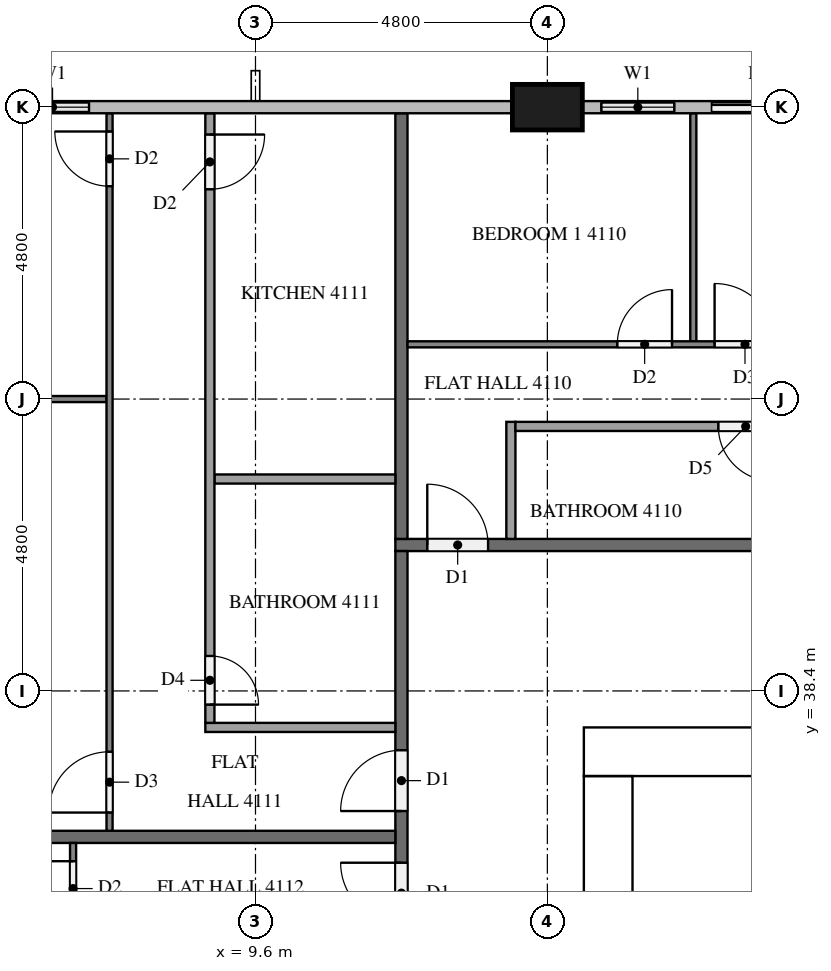
"""IFC4 building model, lengths in metres.
Left out: names, types, materials, properties, quantities, classifications, styles, units other than length and angle.
Written with IfcOpenShell. Run it as: python <this file> out.ifc"""

import sys

from ifc_helpers import new_model, si_unit, direction, frame, frame_2d, origin, origin_2d, place, context, subcontext, project, spatial, rectangle, extrude, element, fill, save


model = new_model("IFC4")
c1 = context("Model", 3, precision=1e-05, world=origin(), true_north=direction((0.0, 1.0)))
c2 = subcontext(c1, "Body", "Model", "MODEL_VIEW")
j1 = project(units=[si_unit("LENGTHUNIT", "METRE"), si_unit("PLANEANGLEUNIT", "RADIAN")], contexts=[c1])
p1 = place(None, origin())
s1 = spatial("IfcSite", under=j1, at=p1, CompositionType="ELEMENT")
p2 = place(p1, origin())
s2 = spatial("IfcBuilding", under=s1, at=p2, CompositionType="ELEMENT")
p3 = place(p2, frame((0.0, 0.0, 159.5)))
s3 = spatial("IfcBuildingStorey", under=s2, at=p3, CompositionType="ELEMENT", Elevation=159.5)
p4 = place(p3, frame((15.0, 37.4, 0.0), z_axis=(0.0, 0.0, 1.0), x_axis=(1.0, 0.0, 0.0)))
e1 = element("IfcWall", 1, at=p4, inside=s3, PredefinedType="SHEAR", context=c2, shape_type="SweptSolid", body=[
    extrude(rectangle(XDim=32.4, YDim=0.8, at=frame_2d((16.2, 0.0))), origin(), (0.0, 0.0, 1.0), 3.2),
])
p5 = place(p4, frame((15.3, 0.0, 0.0)))
e2 = element("IfcOpeningElement", 2, at=p5, cuts=e1, PredefinedType="OPENING", context=c2, shape_type="SweptSolid", body=[
    extrude(rectangle(XDim=1.8, YDim=2.1, at=frame_2d((0.9, 1.05))), frame((0.0, 0.41, 0.0), z_axis=(0.0, -1.0, 0.0), x_axis=(1.0, 0.0, 0.0)), (0.0, 0.0, 1.0), 0.82),
])
p6 = place(p4, frame((1.51, 0.0, 0.0)))
e3 = element("IfcOpeningElement", 3, at=p6, cuts=e1, PredefinedType="OPENING", context=c2, shape_type="SweptSolid", body=[
    extrude(rectangle(XDim=1.0, YDim=2.1, at=frame_2d((0.5, 1.05))), frame((0.0, 0.41, 0.0), z_axis=(0.0, -1.0, 0.0), x_axis=(1.0, 0.0, 0.0)), (0.0, 0.0, 1.0), 0.82),
])
p7 = place(p4, frame((5.11, 0.0, 0.0)))
e4 = element("IfcOpeningElement", 4, at=p7, cuts=e1, PredefinedType="OPENING", context=c2, shape_type="SweptSolid", body=[
    extrude(rectangle(XDim=1.0, YDim=2.1, at=frame_2d((0.5, 1.05))), frame((0.0, 0.41, 0.0), z_axis=(0.0, -1.0, 0.0), x_axis=(1.0, 0.0, 0.0)), (0.0, 0.0, 1.0), 0.82),
])
p8 = place(p3, frame((15.4, 15.8, 0.0), z_axis=(0.0, 0.0, 1.0), x_axis=(0.0, 1.0, 0.0)))
e5 = element("IfcWall", 5, at=p8, inside=s3, PredefinedType="SHEAR", context=c2, shape_type="SweptSolid", body=[
    extrude(rectangle(XDim=21.2, YDim=0.8, at=frame_2d((10.6, 0.0))), origin(), (0.0, 0.0, 1.0), 3.2),
])
p9 = place(p8, frame((4.96, 0.0, 0.0)))
e6 = element("IfcOpeningElement", 6, at=p9, cuts=e5, PredefinedType="OPENING", context=c2, shape_type="SweptSolid", body=[
    extrude(rectangle(XDim=1.2, YDim=2.1, at=frame_2d((0.6, 1.05))), frame((0.0, 0.41, 0.0), z_axis=(0.0, -1.0, 0.0), x_axis=(1.0, 0.0, 0.0)), (0.0, 0.0, 1.0), 0.82),
])
p10 = place(p3, frame((14.4, 48.0, 0.0), z_axis=(0.0, 0.0, 1.0), x_axis=(1.0, 0.0, 0.0)))
e7 = element("IfcColumn", 7, at=p10, inside=s3, PredefinedType="COLUMN", context=c2, shape_type="SweptSolid", body=[
    extrude(rectangle(XDim=1.15, YDim=0.75, at=origin_2d()), origin(), (0.0, 0.0, 1.0), 3.2),
])
p11 = place(p3, frame((19.2, 48.0, 0.0), z_axis=(0.0, 0.0, 1.0), x_axis=(-1.0, 0.0, 0.0)))
e8 = element("IfcWall", 8, at=p11, inside=s3, PredefinedType="SOLIDWALL", context=c2, shape_type="SweptSolid", body=[
    extrude(rectangle(XDim=4.225, YDim=0.15, at=frame_2d((2.112, 0.0))), origin(), (0.0, 0.0, 1.0), 3.2),
])
p12 = place(p11, frame((0.3, 0.0, 0.0)))
e9 = element("IfcOpeningElement", 9, at=p12, cuts=e8, PredefinedType="OPENING", context=c2, shape_type="SweptSolid", body=[
    extrude(rectangle(XDim=1.8, YDim=2.4, at=frame_2d((0.9, 1.2))), frame((0.0, 0.085, 0.0), z_axis=(0.0, -1.0, 0.0), x_axis=(1.0, 0.0, 0.0)), (0.0, 0.0, 1.0), 0.17),
])
p13 = place(p11, frame((2.712, 0.0, 0.9)))
e10 = element("IfcOpeningElement", 10, at=p13, cuts=e8, PredefinedType="OPENING", context=c2, shape_type="SweptSolid", body=[
    extrude(rectangle(XDim=1.2, YDim=1.4, at=frame_2d((0.6, 0.7))), frame((0.0, 0.085, 0.0), z_axis=(0.0, -1.0, 0.0), x_axis=(1.0, 0.0, 0.0)), (0.0, 0.0, 1.0), 0.17),
])
p14 = place(p3, frame((7.2, 48.0, 0.0), z_axis=(0.0, 0.0, 1.0), x_axis=(-1.0, 0.0, 0.0)))
e11 = element("IfcWall", 11, at=p14, inside=s3, PredefinedType="SOLIDWALL", context=c2, shape_type="SweptSolid", body=[
    extrude(rectangle(XDim=1.875, YDim=0.15, at=frame_2d((0.938, 0.0))), origin(), (0.0, 0.0, 1.0), 3.2),
])
p15 = place(p14, frame((0.337, 0.0, 0.9)))
e12 = element("IfcOpeningElement", 12, at=p15, cuts=e11, PredefinedType="OPENING", context=c2, shape_type="SweptSolid", body=[
    extrude(rectangle(XDim=1.2, YDim=1.4, at=frame_2d((0.6, 0.7))), frame((0.0, 0.085, 0.0), z_axis=(0.0, -1.0, 0.0), x_axis=(1.0, 0.0, 0.0)), (0.0, 0.0, 1.0), 0.17),
])
p16 = place(p3, frame((11.9, 40.8, 0.0), z_axis=(0.0, 0.0, 1.0), x_axis=(1.0, 0.0, 0.0)))
e13 = element("IfcWall", 13, at=p16, inside=s3, PredefinedType="PARTITIONING", context=c2, shape_type="SweptSolid", body=[
    extrude(rectangle(XDim=38.6, YDim=0.2, at=frame_2d((19.3, 0.0))), origin(), (0.0, 0.0, 1.0), 3.2),
])
p17 = place(p16, frame((31.725, 0.0, 0.0)))
e14 = element("IfcOpeningElement", 14, at=p17, cuts=e13, PredefinedType="OPENING", context=c2, shape_type="SweptSolid", body=[
    extrude(rectangle(XDim=1.0, YDim=2.1, at=frame_2d((0.5, 1.05))), frame((0.0, 0.11, 0.0), z_axis=(0.0, -1.0, 0.0), x_axis=(1.0, 0.0, 0.0)), (0.0, 0.0, 1.0), 0.22),
])
p18 = place(p16, frame((17.325, 0.0, 0.0)))
e15 = element("IfcOpeningElement", 15, at=p18, cuts=e13, PredefinedType="OPENING", context=c2, shape_type="SweptSolid", body=[
    extrude(rectangle(XDim=1.0, YDim=2.1, at=frame_2d((0.5, 1.05))), frame((0.0, 0.11, 0.0), z_axis=(0.0, -1.0, 0.0), x_axis=(1.0, 0.0, 0.0)), (0.0, 0.0, 1.0), 0.22),
])
p19 = place(p16, frame((0.525, 0.0, 0.0)))
e16 = element("IfcOpeningElement", 16, at=p19, cuts=e13, PredefinedType="OPENING", context=c2, shape_type="SweptSolid", body=[
    extrude(rectangle(XDim=1.0, YDim=2.1, at=frame_2d((0.5, 1.05))), frame((0.0, 0.11, 0.0), z_axis=(0.0, -1.0, 0.0), x_axis=(1.0, 0.0, 0.0)), (0.0, 0.0, 1.0), 0.22),
])
p20 = place(p3, frame((12.0, 12.1, 0.0), z_axis=(0.0, 0.0, 1.0), x_axis=(0.0, 1.0, 0.0)))
e17 = element("IfcWall", 17, at=p20, inside=s3, PredefinedType="PARTITIONING", context=c2, shape_type="SweptSolid", body=[
    extrude(rectangle(XDim=28.6, YDim=0.2, at=frame_2d((14.3, 0.0))), origin(), (0.0, 0.0, 1.0), 3.2),
])
p21 = place(p20, frame((24.325, 0.0, 0.0)))
e18 = element("IfcOpeningElement", 18, at=p21, cuts=e17, PredefinedType="OPENING", context=c2, shape_type="SweptSolid", body=[
    extrude(rectangle(XDim=1.0, YDim=2.1, at=frame_2d((0.5, 1.05))), frame((0.0, 0.11, 0.0), z_axis=(0.0, -1.0, 0.0), x_axis=(1.0, 0.0, 0.0)), (0.0, 0.0, 1.0), 0.22),
])
p22 = place(p20, frame((22.475, 0.0, 0.0)))
e19 = element("IfcOpeningElement", 19, at=p22, cuts=e17, PredefinedType="OPENING", context=c2, shape_type="SweptSolid", body=[
    extrude(rectangle(XDim=1.0, YDim=2.1, at=frame_2d((0.5, 1.05))), frame((0.0, 0.11, 0.0), z_axis=(0.0, -1.0, 0.0), x_axis=(1.0, 0.0, 0.0)), (0.0, 0.0, 1.0), 0.22),
])
p23 = place(p20, frame((0.325, 0.0, 0.0)))
e20 = element("IfcOpeningElement", 20, at=p23, cuts=e17, PredefinedType="OPENING", context=c2, shape_type="SweptSolid", body=[
    extrude(rectangle(XDim=1.0, YDim=2.1, at=frame_2d((0.5, 1.05))), frame((0.0, 0.11, 0.0), z_axis=(0.0, -1.0, 0.0), x_axis=(1.0, 0.0, 0.0)), (0.0, 0.0, 1.0), 0.22),
])
p24 = place(p3, frame((12.0, 47.9, 0.0), z_axis=(0.0, 0.0, 1.0), x_axis=(0.0, -1.0, 0.0)))
e21 = element("IfcWall", 21, at=p24, inside=s3, PredefinedType="PARTITIONING", context=c2, shape_type="SweptSolid", body=[
    extrude(rectangle(XDim=7.0, YDim=0.2, at=frame_2d((3.5, 0.0))), origin(), (0.0, 0.0, 1.0), 3.2),
])
p25 = place(p3, frame((0.1, 36.0, 0.0), z_axis=(0.0, 0.0, 1.0), x_axis=(1.0, 0.0, 0.0)))
e22 = element("IfcWall", 22, at=p25, inside=s3, PredefinedType="PARTITIONING", context=c2, shape_type="SweptSolid", body=[
    extrude(rectangle(XDim=11.8, YDim=0.2, at=frame_2d((5.9, 0.0))), origin(), (0.0, 0.0, 1.0), 3.2),
])
p26 = place(p3, frame((16.8, 44.15, 0.0), z_axis=(0.0, 0.0, 1.0), x_axis=(0.0, 1.0, 0.0)))
e23 = element("IfcWall", 23, at=p26, inside=s3, PredefinedType="PARTITIONING", context=c2, shape_type="SweptSolid", body=[
    extrude(rectangle(XDim=3.75, YDim=0.1, at=frame_2d((1.875, 0.0))), origin(), (0.0, 0.0, 1.0), 3.2),
])
p27 = place(p3, frame((12.1, 44.1, 0.0), z_axis=(0.0, 0.0, 1.0), x_axis=(1.0, 0.0, 0.0)))
e24 = element("IfcWall", 24, at=p27, inside=s3, PredefinedType="PARTITIONING", context=c2, shape_type="SweptSolid", body=[
    extrude(rectangle(XDim=16.6, YDim=0.1, at=frame_2d((8.3, 0.0))), origin(), (0.0, 0.0, 1.0), 3.2),
])
p28 = place(p27, frame((3.45, 0.0, 0.0)))
e25 = element("IfcOpeningElement", 25, at=p28, cuts=e24, PredefinedType="OPENING", context=c2, shape_type="SweptSolid", body=[
    extrude(rectangle(XDim=0.9, YDim=2.1, at=frame_2d((0.45, 1.05))), frame((0.0, 0.06, 0.0), z_axis=(0.0, -1.0, 0.0), x_axis=(1.0, 0.0, 0.0)), (0.0, 0.0, 1.0), 0.12),
])
p29 = place(p27, frame((5.05, 0.0, 0.0)))
e26 = element("IfcOpeningElement", 26, at=p29, cuts=e24, PredefinedType="OPENING", context=c2, shape_type="SweptSolid", body=[
    extrude(rectangle(XDim=1.0, YDim=2.1, at=frame_2d((0.5, 1.05))), frame((0.0, 0.06, 0.0), z_axis=(0.0, -1.0, 0.0), x_axis=(1.0, 0.0, 0.0)), (0.0, 0.0, 1.0), 0.12),
])
p30 = place(p27, frame((15.4, 0.0, 0.0)))
e27 = element("IfcOpeningElement", 27, at=p30, cuts=e24, PredefinedType="OPENING", context=c2, shape_type="SweptSolid", body=[
    extrude(rectangle(XDim=0.9, YDim=2.1, at=frame_2d((0.45, 1.05))), frame((0.0, 0.06, 0.0), z_axis=(0.0, -1.0, 0.0), x_axis=(1.0, 0.0, 0.0)), (0.0, 0.0, 1.0), 0.12),
])
p31 = place(p3, frame((13.8, 40.9, 0.0), z_axis=(0.0, 0.0, 1.0), x_axis=(0.0, 1.0, 0.0)))
e28 = element("IfcWall", 28, at=p31, inside=s3, PredefinedType="PARTITIONING", context=c2, shape_type="SweptSolid", body=[
    extrude(rectangle(XDim=1.925, YDim=0.15, at=frame_2d((0.962, 0.0))), origin(), (0.0, 0.0, 1.0), 3.2),
])
p32 = place(p3, frame((28.7, 42.75, 0.0), z_axis=(0.0, 0.0, 1.0), x_axis=(-1.0, 0.0, 0.0)))
e29 = element("IfcWall", 29, at=p32, inside=s3, PredefinedType="PARTITIONING", context=c2, shape_type="SweptSolid", body=[
    extrude(rectangle(XDim=14.825, YDim=0.15, at=frame_2d((7.413, 0.0))), origin(), (0.0, 0.0, 1.0), 3.2),
])
p33 = place(p32, frame((10.588, 0.0, 0.0)))
e30 = element("IfcOpeningElement", 30, at=p33, cuts=e29, PredefinedType="OPENING", context=c2, shape_type="SweptSolid", body=[
    extrude(rectangle(XDim=0.9, YDim=2.1, at=frame_2d((0.45, 1.05))), frame((0.0, 0.085, 0.0), z_axis=(0.0, -1.0, 0.0), x_axis=(1.0, 0.0, 0.0)), (0.0, 0.0, 1.0), 0.17),
])
p34 = place(p32, frame((9.138, 0.0, 0.0)))
e31 = element("IfcOpeningElement", 31, at=p34, cuts=e29, PredefinedType="OPENING", context=c2, shape_type="SweptSolid", body=[
    extrude(rectangle(XDim=0.8, YDim=2.1, at=frame_2d((0.4, 1.05))), frame((0.0, 0.085, 0.0), z_axis=(0.0, -1.0, 0.0), x_axis=(1.0, 0.0, 0.0)), (0.0, 0.0, 1.0), 0.17),
])
p35 = place(p32, frame((0.35, 0.0, 0.0)))
e32 = element("IfcOpeningElement", 32, at=p35, cuts=e29, PredefinedType="OPENING", context=c2, shape_type="SweptSolid", body=[
    extrude(rectangle(XDim=0.9, YDim=2.1, at=frame_2d((0.45, 1.05))), frame((0.0, 0.085, 0.0), z_axis=(0.0, -1.0, 0.0), x_axis=(1.0, 0.0, 0.0)), (0.0, 0.0, 1.0), 0.17),
])
p36 = place(p3, frame((7.15, 43.2, 0.0), z_axis=(0.0, 0.0, 1.0), x_axis=(-1.0, 0.0, 0.0)))
e33 = element("IfcWall", 33, at=p36, inside=s3, PredefinedType="PARTITIONING", context=c2, shape_type="SweptSolid", body=[
    extrude(rectangle(XDim=6.625, YDim=0.1, at=frame_2d((3.312, 0.0))), origin(), (0.0, 0.0, 1.0), 3.2),
])
p37 = place(p3, frame((7.2, 36.1, 0.0), z_axis=(0.0, 0.0, 1.0), x_axis=(0.0, 1.0, 0.0)))
e34 = element("IfcWall", 34, at=p37, inside=s3, PredefinedType="PARTITIONING", context=c2, shape_type="SweptSolid", body=[
    extrude(rectangle(XDim=11.8, YDim=0.1, at=frame_2d((5.9, 0.0))), origin(), (0.0, 0.0, 1.0), 3.2),
])
p38 = place(p37, frame((0.3, 0.0, 0.0)))
e35 = element("IfcOpeningElement", 35, at=p38, cuts=e34, PredefinedType="OPENING", context=c2, shape_type="SweptSolid", body=[
    extrude(rectangle(XDim=1.0, YDim=2.1, at=frame_2d((0.5, 1.05))), frame((0.0, 0.06, 0.0), z_axis=(0.0, -1.0, 0.0), x_axis=(1.0, 0.0, 0.0)), (0.0, 0.0, 1.0), 0.12),
])
p39 = place(p37, frame((10.6, 0.0, 0.0)))
e36 = element("IfcOpeningElement", 36, at=p39, cuts=e34, PredefinedType="OPENING", context=c2, shape_type="SweptSolid", body=[
    extrude(rectangle(XDim=0.9, YDim=2.1, at=frame_2d((0.45, 1.05))), frame((0.0, 0.06, 0.0), z_axis=(0.0, -1.0, 0.0), x_axis=(1.0, 0.0, 0.0)), (0.0, 0.0, 1.0), 0.12),
])
p40 = place(p3, frame((11.9, 41.885, 0.0), z_axis=(0.0, 0.0, 1.0), x_axis=(-1.0, 0.0, 0.0)))
e37 = element("IfcWall", 37, at=p40, inside=s3, PredefinedType="PARTITIONING", context=c2, shape_type="SweptSolid", body=[
    extrude(rectangle(XDim=2.975, YDim=0.15, at=frame_2d((1.487, 0.0))), origin(), (0.0, 0.0, 1.0), 3.2),
])
p41 = place(p3, frame((11.9, 37.8, 0.0), z_axis=(0.0, 0.0, 1.0), x_axis=(-1.0, 0.0, 0.0)))
e38 = element("IfcWall", 38, at=p41, inside=s3, PredefinedType="PARTITIONING", context=c2, shape_type="SweptSolid", body=[
    extrude(rectangle(XDim=3.125, YDim=0.15, at=frame_2d((1.562, 0.0))), origin(), (0.0, 0.0, 1.0), 3.2),
])
p42 = place(p3, frame((8.85, 47.9, 0.0), z_axis=(0.0, 0.0, 1.0), x_axis=(0.0, -1.0, 0.0)))
e39 = element("IfcWall", 39, at=p42, inside=s3, PredefinedType="PARTITIONING", context=c2, shape_type="SweptSolid", body=[
    extrude(rectangle(XDim=10.025, YDim=0.15, at=frame_2d((5.012, 0.0))), origin(), (0.0, 0.0, 1.0), 3.2),
])
p43 = place(p42, frame((8.925, 0.0, 0.0)))
e40 = element("IfcOpeningElement", 40, at=p43, cuts=e39, PredefinedType="OPENING", context=c2, shape_type="SweptSolid", body=[
    extrude(rectangle(XDim=0.8, YDim=2.1, at=frame_2d((0.4, 1.05))), frame((0.0, 0.085, 0.0), z_axis=(0.0, -1.0, 0.0), x_axis=(1.0, 0.0, 0.0)), (0.0, 0.0, 1.0), 0.17),
])
p44 = place(p42, frame((0.35, 0.0, 0.0)))
e41 = element("IfcOpeningElement", 41, at=p44, cuts=e39, PredefinedType="OPENING", context=c2, shape_type="SweptSolid", body=[
    extrude(rectangle(XDim=0.9, YDim=2.1, at=frame_2d((0.45, 1.05))), frame((0.0, 0.085, 0.0), z_axis=(0.0, -1.0, 0.0), x_axis=(1.0, 0.0, 0.0)), (0.0, 0.0, 1.0), 0.17),
])
p45 = place(p3, frame((6.6, 26.5, 0.0), z_axis=(0.0, 0.0, 1.0), x_axis=(0.0, 1.0, 0.0)))
e42 = element("IfcWall", 42, at=p45, inside=s3, PredefinedType="PARTITIONING", context=c2, shape_type="SweptSolid", body=[
    extrude(rectangle(XDim=9.4, YDim=0.1, at=frame_2d((4.7, 0.0))), origin(), (0.0, 0.0, 1.0), 3.2),
])
p46 = place(p45, frame((8.2, 0.0, 0.0)))
e43 = element("IfcOpeningElement", 43, at=p46, cuts=e42, PredefinedType="OPENING", context=c2, shape_type="SweptSolid", body=[
    extrude(rectangle(XDim=0.9, YDim=2.1, at=frame_2d((0.45, 1.05))), frame((0.0, 0.06, 0.0), z_axis=(0.0, -1.0, 0.0), x_axis=(1.0, 0.0, 0.0)), (0.0, 0.0, 1.0), 0.12),
])
p47 = place(p45, frame((0.3, 0.0, 0.0)))
e44 = element("IfcOpeningElement", 44, at=p47, cuts=e42, PredefinedType="OPENING", context=c2, shape_type="SweptSolid", body=[
    extrude(rectangle(XDim=1.0, YDim=2.1, at=frame_2d((0.5, 1.05))), frame((0.0, 0.06, 0.0), z_axis=(0.0, -1.0, 0.0), x_axis=(1.0, 0.0, 0.0)), (0.0, 0.0, 1.0), 0.12),
])
p48 = place(p12, origin())
e45 = element("IfcDoor", 45, at=p48, inside=s3, OperationType="SLIDING_TO_RIGHT", PredefinedType="DOOR", context=c2, shape_type="SweptSolid", body=[
    extrude(rectangle(XDim=1.8, YDim=2.4, at=frame_2d((0.9, 1.2))), frame((0.0, 0.025, 0.0), z_axis=(0.0, -1.0, 0.0), x_axis=(1.0, 0.0, 0.0)), (0.0, 0.0, 1.0), 0.05),
])
fill(e9, e45)
p49 = place(p13, origin())
e46 = element("IfcWindow", 46, at=p49, inside=s3, PartitioningType="SINGLE_PANEL", PredefinedType="WINDOW", context=c2, shape_type="SweptSolid", body=[
    extrude(rectangle(XDim=1.2, YDim=1.4, at=frame_2d((0.6, 0.7))), frame((0.0, 0.03, 0.0), z_axis=(0.0, -1.0, 0.0), x_axis=(1.0, 0.0, 0.0)), (0.0, 0.0, 1.0), 0.06),
])
fill(e10, e46)
p50 = place(p15, origin())
e47 = element("IfcWindow", 47, at=p50, inside=s3, PartitioningType="SINGLE_PANEL", PredefinedType="WINDOW", context=c2, shape_type="SweptSolid", body=[
    extrude(rectangle(XDim=1.2, YDim=1.4, at=frame_2d((0.6, 0.7))), frame((0.0, 0.03, 0.0), z_axis=(0.0, -1.0, 0.0), x_axis=(1.0, 0.0, 0.0)), (0.0, 0.0, 1.0), 0.06),
])
fill(e12, e47)
p51 = place(p6, origin())
e48 = element("IfcDoor", 48, at=p51, inside=s3, OperationType="SINGLE_SWING_RIGHT", PredefinedType="DOOR", context=c2, shape_type="SweptSolid", body=[
    extrude(rectangle(XDim=1.0, YDim=2.1, at=frame_2d((0.5, 1.05))), frame((0.0, 0.025, 0.0), z_axis=(0.0, -1.0, 0.0), x_axis=(1.0, 0.0, 0.0)), (0.0, 0.0, 1.0), 0.05),
])
fill(e3, e48)
p52 = place(p19, origin())
e49 = element("IfcDoor", 49, at=p52, inside=s3, OperationType="SINGLE_SWING_LEFT", PredefinedType="DOOR", context=c2, shape_type="SweptSolid", body=[
    extrude(rectangle(XDim=1.0, YDim=2.1, at=frame_2d((0.5, 1.05))), frame((0.0, 0.025, 0.0), z_axis=(0.0, -1.0, 0.0), x_axis=(1.0, 0.0, 0.0)), (0.0, 0.0, 1.0), 0.05),
])
fill(e16, e49)
p53 = place(p21, origin())
e50 = element("IfcDoor", 50, at=p53, inside=s3, OperationType="SINGLE_SWING_LEFT", PredefinedType="DOOR", context=c2, shape_type="SweptSolid", body=[
    extrude(rectangle(XDim=1.0, YDim=2.1, at=frame_2d((0.5, 1.05))), frame((0.0, 0.025, 0.0), z_axis=(0.0, -1.0, 0.0), x_axis=(1.0, 0.0, 0.0)), (0.0, 0.0, 1.0), 0.05),
])
fill(e18, e50)
p54 = place(p22, origin())
e51 = element("IfcDoor", 51, at=p54, inside=s3, OperationType="SINGLE_SWING_RIGHT", PredefinedType="DOOR", context=c2, shape_type="SweptSolid", body=[
    extrude(rectangle(XDim=1.0, YDim=2.1, at=frame_2d((0.5, 1.05))), frame((0.0, 0.025, 0.0), z_axis=(0.0, -1.0, 0.0), x_axis=(1.0, 0.0, 0.0)), (0.0, 0.0, 1.0), 0.05),
])
fill(e19, e51)
p55 = place(p28, origin())
e52 = element("IfcDoor", 52, at=p55, inside=s3, OperationType="SINGLE_SWING_RIGHT", PredefinedType="DOOR", context=c2, shape_type="SweptSolid", body=[
    extrude(rectangle(XDim=0.9, YDim=2.1, at=frame_2d((0.45, 1.05))), frame((0.0, 0.025, 0.0), z_axis=(0.0, -1.0, 0.0), x_axis=(1.0, 0.0, 0.0)), (0.0, 0.0, 1.0), 0.05),
])
fill(e25, e52)
p56 = place(p29, origin())
e53 = element("IfcDoor", 53, at=p56, inside=s3, OperationType="SINGLE_SWING_LEFT", PredefinedType="DOOR", context=c2, shape_type="SweptSolid", body=[
    extrude(rectangle(XDim=1.0, YDim=2.1, at=frame_2d((0.5, 1.05))), frame((0.0, 0.025, 0.0), z_axis=(0.0, -1.0, 0.0), x_axis=(1.0, 0.0, 0.0)), (0.0, 0.0, 1.0), 0.05),
])
fill(e26, e53)
p57 = place(p33, origin())
e54 = element("IfcDoor", 54, at=p57, inside=s3, OperationType="SINGLE_SWING_LEFT", PredefinedType="DOOR", context=c2, shape_type="SweptSolid", body=[
    extrude(rectangle(XDim=0.9, YDim=2.1, at=frame_2d((0.45, 1.05))), frame((0.0, 0.025, 0.0), z_axis=(0.0, -1.0, 0.0), x_axis=(1.0, 0.0, 0.0)), (0.0, 0.0, 1.0), 0.05),
])
fill(e30, e54)
p58 = place(p38, origin())
e55 = element("IfcDoor", 55, at=p58, inside=s3, OperationType="SINGLE_SWING_LEFT", PredefinedType="DOOR", context=c2, shape_type="SweptSolid", body=[
    extrude(rectangle(XDim=1.0, YDim=2.1, at=frame_2d((0.5, 1.05))), frame((0.0, 0.025, 0.0), z_axis=(0.0, -1.0, 0.0), x_axis=(1.0, 0.0, 0.0)), (0.0, 0.0, 1.0), 0.05),
])
fill(e35, e55)
p59 = place(p39, origin())
e56 = element("IfcDoor", 56, at=p59, inside=s3, OperationType="SINGLE_SWING_RIGHT", PredefinedType="DOOR", context=c2, shape_type="SweptSolid", body=[
    extrude(rectangle(XDim=0.9, YDim=2.1, at=frame_2d((0.45, 1.05))), frame((0.0, 0.025, 0.0), z_axis=(0.0, -1.0, 0.0), x_axis=(1.0, 0.0, 0.0)), (0.0, 0.0, 1.0), 0.05),
])
fill(e36, e56)
p60 = place(p43, origin())
e57 = element("IfcDoor", 57, at=p60, inside=s3, OperationType="SINGLE_SWING_RIGHT", PredefinedType="DOOR", context=c2, shape_type="SweptSolid", body=[
    extrude(rectangle(XDim=0.8, YDim=2.1, at=frame_2d((0.4, 1.05))), frame((0.0, 0.025, 0.0), z_axis=(0.0, -1.0, 0.0), x_axis=(1.0, 0.0, 0.0)), (0.0, 0.0, 1.0), 0.05),
])
fill(e40, e57)
p61 = place(p44, origin())
e58 = element("IfcDoor", 58, at=p61, inside=s3, OperationType="SINGLE_SWING_LEFT", PredefinedType="DOOR", context=c2, shape_type="SweptSolid", body=[
    extrude(rectangle(XDim=0.9, YDim=2.1, at=frame_2d((0.45, 1.05))), frame((0.0, 0.025, 0.0), z_axis=(0.0, -1.0, 0.0), x_axis=(1.0, 0.0, 0.0)), (0.0, 0.0, 1.0), 0.05),
])
fill(e41, e58)
p62 = place(p46, origin())
e59 = element("IfcDoor", 59, at=p62, inside=s3, OperationType="SINGLE_SWING_RIGHT", PredefinedType="DOOR", context=c2, shape_type="SweptSolid", body=[
    extrude(rectangle(XDim=0.9, YDim=2.1, at=frame_2d((0.45, 1.05))), frame((0.0, 0.025, 0.0), z_axis=(0.0, -1.0, 0.0), x_axis=(1.0, 0.0, 0.0)), (0.0, 0.0, 1.0), 0.05),
])
fill(e43, e59)
save(model, sys.argv[1])
